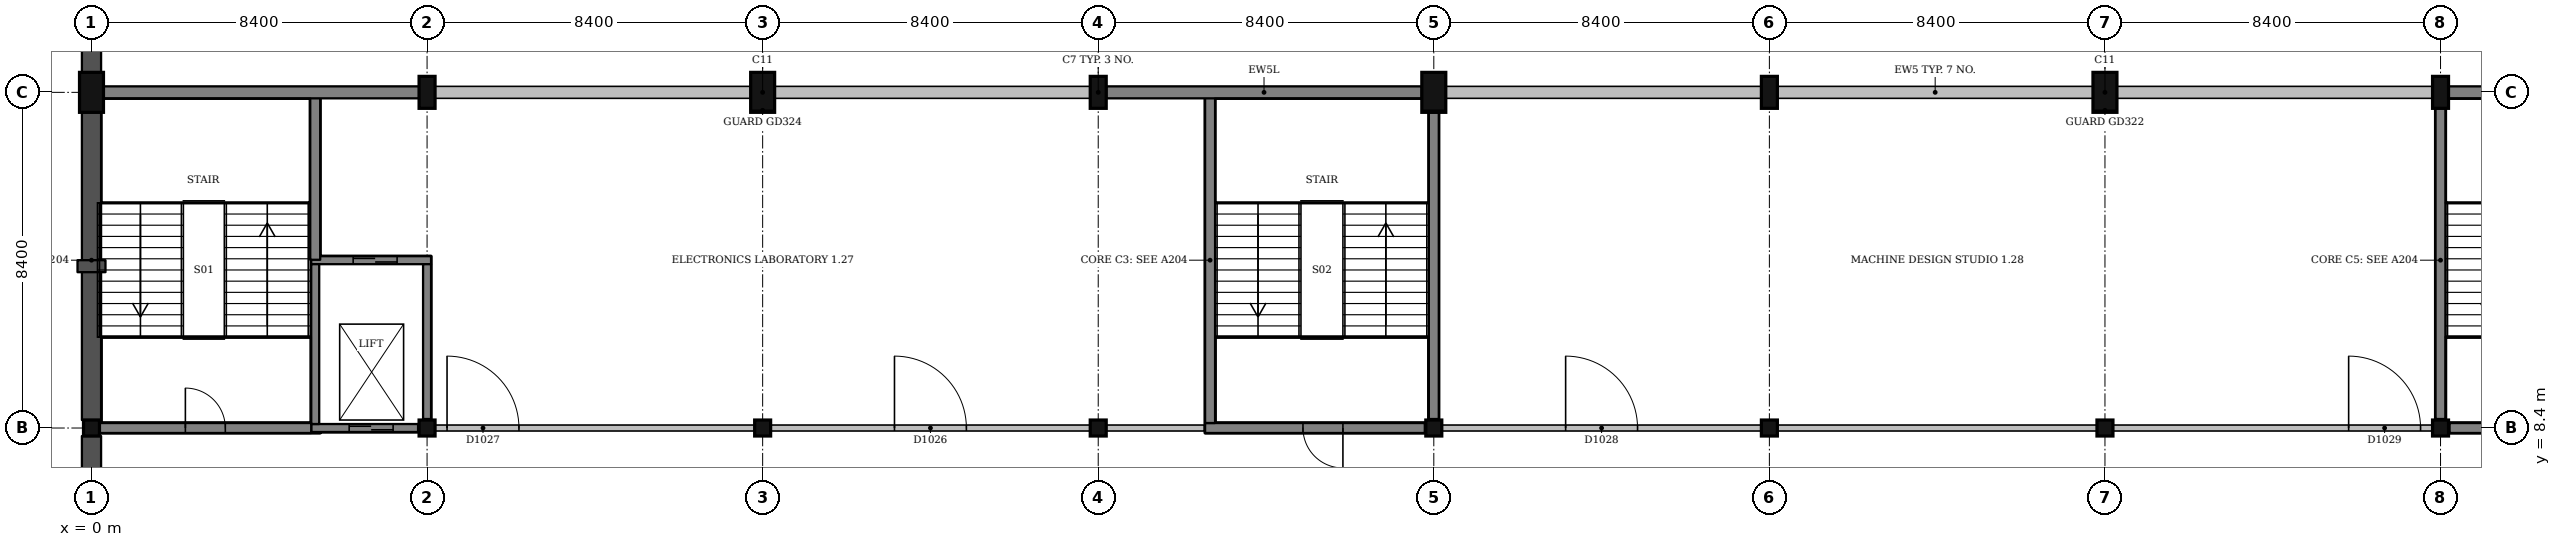
"""IFC4 building model, lengths in metres.
Left out: names, types, materials, properties, quantities, classifications, styles, units other than length and angle.
Written with IfcOpenShell. Run it as: python <this file> out.ifc"""

import sys

from ifc_helpers import new_model, si_unit, direction, frame, frame_2d, origin, origin_2d, place, context, subcontext, project, spatial, rectangle, extrude, element, fill, save


model = new_model("IFC4")
c1 = context("Model", 3, precision=1e-05, world=origin(), true_north=direction((0.0, 1.0)))
c2 = subcontext(c1, "Body", "Model", "MODEL_VIEW")
j1 = project(units=[si_unit("LENGTHUNIT", "METRE"), si_unit("PLANEANGLEUNIT", "RADIAN")], contexts=[c1])
p1 = place(None, origin())
s1 = spatial("IfcSite", under=j1, at=p1, CompositionType="ELEMENT")
p2 = place(p1, origin())
s2 = spatial("IfcBuilding", under=s1, at=p2, CompositionType="ELEMENT")
p3 = place(p2, frame((0.0, 0.0, 4.5)))
s3 = spatial("IfcBuildingStorey", under=s2, at=p3, CompositionType="ELEMENT", Elevation=4.5)
p4 = place(p3, frame((0.0, 8.4, 0.0), z_axis=(0.0, 0.0, 1.0), x_axis=(1.0, 0.0, 0.0)))
e1 = element("IfcColumn", 1, at=p4, inside=s3, PredefinedType="COLUMN", context=c2, shape_type="SweptSolid", body=[
    extrude(rectangle(XDim=0.4, YDim=0.4, at=origin_2d()), origin(), (0.0, 0.0, 1.0), 4.5),
])
p5 = place(p3, frame((0.0, 16.8, 0.0), z_axis=(0.0, 0.0, 1.0), x_axis=(1.0, 0.0, 0.0)))
e2 = element("IfcColumn", 2, at=p5, inside=s3, PredefinedType="COLUMN", context=c2, shape_type="SweptSolid", body=[
    extrude(rectangle(XDim=0.6, YDim=1.0, at=origin_2d()), origin(), (0.0, 0.0, 1.0), 4.5),
])
p6 = place(p3, frame((8.4, 8.4, 0.0), z_axis=(0.0, 0.0, 1.0), x_axis=(1.0, 0.0, 0.0)))
e3 = element("IfcColumn", 3, at=p6, inside=s3, PredefinedType="COLUMN", context=c2, shape_type="SweptSolid", body=[
    extrude(rectangle(XDim=0.4, YDim=0.4, at=origin_2d()), origin(), (0.0, 0.0, 1.0), 4.5),
])
p7 = place(p3, frame((8.4, 16.8, 0.0), z_axis=(0.0, 0.0, 1.0), x_axis=(1.0, 0.0, 0.0)))
e4 = element("IfcColumn", 4, at=p7, inside=s3, PredefinedType="COLUMN", context=c2, shape_type="SweptSolid", body=[
    extrude(rectangle(XDim=0.4, YDim=0.8, at=origin_2d()), origin(), (0.0, 0.0, 1.0), 4.5),
])
p8 = place(p3, frame((16.8, 8.4, 0.0), z_axis=(0.0, 0.0, 1.0), x_axis=(1.0, 0.0, 0.0)))
e5 = element("IfcColumn", 5, at=p8, inside=s3, PredefinedType="COLUMN", context=c2, shape_type="SweptSolid", body=[
    extrude(rectangle(XDim=0.4, YDim=0.4, at=origin_2d()), origin(), (0.0, 0.0, 1.0), 4.5),
])
p9 = place(p3, frame((16.8, 16.8, 0.0), z_axis=(0.0, 0.0, 1.0), x_axis=(1.0, 0.0, 0.0)))
e6 = element("IfcColumn", 6, at=p9, inside=s3, PredefinedType="COLUMN", context=c2, shape_type="SweptSolid", body=[
    extrude(rectangle(XDim=0.6, YDim=1.0, at=origin_2d()), origin(), (0.0, 0.0, 1.0), 4.5),
])
p10 = place(p3, frame((25.2, 8.4, 0.0), z_axis=(0.0, 0.0, 1.0), x_axis=(1.0, 0.0, 0.0)))
e7 = element("IfcColumn", 7, at=p10, inside=s3, PredefinedType="COLUMN", context=c2, shape_type="SweptSolid", body=[
    extrude(rectangle(XDim=0.4, YDim=0.4, at=origin_2d()), origin(), (0.0, 0.0, 1.0), 4.5),
])
p11 = place(p3, frame((25.2, 16.8, 0.0), z_axis=(0.0, 0.0, 1.0), x_axis=(1.0, 0.0, 0.0)))
e8 = element("IfcColumn", 8, at=p11, inside=s3, PredefinedType="COLUMN", context=c2, shape_type="SweptSolid", body=[
    extrude(rectangle(XDim=0.4, YDim=0.8, at=origin_2d()), origin(), (0.0, 0.0, 1.0), 4.5),
])
p12 = place(p3, frame((33.6, 8.4, 0.0), z_axis=(0.0, 0.0, 1.0), x_axis=(1.0, 0.0, 0.0)))
e9 = element("IfcColumn", 9, at=p12, inside=s3, PredefinedType="COLUMN", context=c2, shape_type="SweptSolid", body=[
    extrude(rectangle(XDim=0.4, YDim=0.4, at=origin_2d()), origin(), (0.0, 0.0, 1.0), 4.5),
])
p13 = place(p3, frame((33.6, 16.8, 0.0), z_axis=(0.0, 0.0, 1.0), x_axis=(1.0, 0.0, 0.0)))
e10 = element("IfcColumn", 10, at=p13, inside=s3, PredefinedType="COLUMN", context=c2, shape_type="SweptSolid", body=[
    extrude(rectangle(XDim=0.6, YDim=1.0, at=origin_2d()), origin(), (0.0, 0.0, 1.0), 4.5),
])
p14 = place(p3, frame((42.0, 8.4, 0.0), z_axis=(0.0, 0.0, 1.0), x_axis=(1.0, 0.0, 0.0)))
e11 = element("IfcColumn", 11, at=p14, inside=s3, PredefinedType="COLUMN", context=c2, shape_type="SweptSolid", body=[
    extrude(rectangle(XDim=0.4, YDim=0.4, at=origin_2d()), origin(), (0.0, 0.0, 1.0), 4.5),
])
p15 = place(p3, frame((42.0, 16.8, 0.0), z_axis=(0.0, 0.0, 1.0), x_axis=(1.0, 0.0, 0.0)))
e12 = element("IfcColumn", 12, at=p15, inside=s3, PredefinedType="COLUMN", context=c2, shape_type="SweptSolid", body=[
    extrude(rectangle(XDim=0.4, YDim=0.8, at=origin_2d()), origin(), (0.0, 0.0, 1.0), 4.5),
])
p16 = place(p3, frame((50.4, 8.4, 0.0), z_axis=(0.0, 0.0, 1.0), x_axis=(1.0, 0.0, 0.0)))
e13 = element("IfcColumn", 13, at=p16, inside=s3, PredefinedType="COLUMN", context=c2, shape_type="SweptSolid", body=[
    extrude(rectangle(XDim=0.4, YDim=0.4, at=origin_2d()), origin(), (0.0, 0.0, 1.0), 4.5),
])
p17 = place(p3, frame((50.4, 16.8, 0.0), z_axis=(0.0, 0.0, 1.0), x_axis=(1.0, 0.0, 0.0)))
e14 = element("IfcColumn", 14, at=p17, inside=s3, PredefinedType="COLUMN", context=c2, shape_type="SweptSolid", body=[
    extrude(rectangle(XDim=0.6, YDim=1.0, at=origin_2d()), origin(), (0.0, 0.0, 1.0), 4.5),
])
p18 = place(p3, frame((58.8, 8.4, 0.0), z_axis=(0.0, 0.0, 1.0), x_axis=(1.0, 0.0, 0.0)))
e15 = element("IfcColumn", 15, at=p18, inside=s3, PredefinedType="COLUMN", context=c2, shape_type="SweptSolid", body=[
    extrude(rectangle(XDim=0.4, YDim=0.4, at=origin_2d()), origin(), (0.0, 0.0, 1.0), 4.5),
])
p19 = place(p3, frame((58.8, 16.8, 0.0), z_axis=(0.0, 0.0, 1.0), x_axis=(1.0, 0.0, 0.0)))
e16 = element("IfcColumn", 16, at=p19, inside=s3, PredefinedType="COLUMN", context=c2, shape_type="SweptSolid", body=[
    extrude(rectangle(XDim=0.4, YDim=0.8, at=origin_2d()), origin(), (0.0, 0.0, 1.0), 4.5),
])
p20 = place(p3, frame((5.5, 8.4, 0.0), z_axis=(0.0, 0.0, 1.0), x_axis=(1.0, 0.0, 0.0)))
e17 = element("IfcWall", 17, at=p20, inside=s3, PredefinedType="SHEAR", context=c2, shape_type="SweptSolid", body=[
    extrude(rectangle(XDim=2.675, YDim=0.2, at=frame_2d((1.337, 0.0))), origin(), (0.0, 0.0, 1.0), 4.5),
])
p21 = place(p20, frame((0.95, 0.0, 0.0)))
e18 = element("IfcOpeningElement", 18, at=p21, cuts=e17, PredefinedType="OPENING", context=c2, shape_type="SweptSolid", body=[
    extrude(rectangle(XDim=1.1, YDim=2.1, at=frame_2d((0.55, 1.05))), frame((0.0, 0.11, 0.0), z_axis=(0.0, -1.0, 0.0), x_axis=(1.0, 0.0, 0.0)), (0.0, 0.0, 1.0), 0.22),
])
p22 = place(p3, frame((5.5, 12.6, 0.0), z_axis=(0.0, 0.0, 1.0), x_axis=(1.0, 0.0, 0.0)))
e19 = element("IfcWall", 19, at=p22, inside=s3, PredefinedType="SHEAR", context=c2, shape_type="SweptSolid", body=[
    extrude(rectangle(XDim=3.0, YDim=0.2, at=frame_2d((1.5, 0.0))), origin(), (0.0, 0.0, 1.0), 4.5),
])
p23 = place(p22, frame((1.05, 0.0, 0.0)))
e20 = element("IfcOpeningElement", 20, at=p23, cuts=e19, PredefinedType="OPENING", context=c2, shape_type="SweptSolid", body=[
    extrude(rectangle(XDim=1.1, YDim=2.1, at=frame_2d((0.55, 1.05))), frame((0.0, 0.11, 0.0), z_axis=(0.0, -1.0, 0.0), x_axis=(1.0, 0.0, 0.0)), (0.0, 0.0, 1.0), 0.22),
])
p24 = place(p3, frame((5.6, 8.5, 0.0), z_axis=(0.0, 0.0, 1.0), x_axis=(0.0, 1.0, 0.0)))
e21 = element("IfcWall", 21, at=p24, inside=s3, PredefinedType="SHEAR", context=c2, shape_type="SweptSolid", body=[
    extrude(rectangle(XDim=4.0, YDim=0.2, at=frame_2d((2.0, 0.0))), origin(), (0.0, 0.0, 1.0), 4.5),
])
p25 = place(p3, frame((8.4, 8.625, 0.0), z_axis=(0.0, 0.0, 1.0), x_axis=(0.0, 1.0, 0.0)))
e22 = element("IfcWall", 22, at=p25, inside=s3, PredefinedType="SHEAR", context=c2, shape_type="SweptSolid", body=[
    extrude(rectangle(XDim=3.875, YDim=0.2, at=frame_2d((1.938, 0.0))), origin(), (0.0, 0.0, 1.0), 4.5),
])
p26 = place(p3, frame((0.2, 8.4, 0.0), z_axis=(0.0, 0.0, 1.0), x_axis=(1.0, 0.0, 0.0)))
e23 = element("IfcWall", 23, at=p26, inside=s3, PredefinedType="SHEAR", context=c2, shape_type="SweptSolid", body=[
    extrude(rectangle(XDim=5.3, YDim=0.25, at=frame_2d((2.65, 0.0))), origin(), (0.0, 0.0, 1.0), 4.5),
])
p27 = place(p26, frame((2.15, 0.0, 0.0)))
e24 = element("IfcOpeningElement", 24, at=p27, cuts=e23, PredefinedType="OPENING", context=c2, shape_type="SweptSolid", body=[
    extrude(rectangle(XDim=1.0, YDim=2.1, at=frame_2d((0.5, 1.05))), frame((0.0, 0.135, 0.0), z_axis=(0.0, -1.0, 0.0), x_axis=(1.0, 0.0, 0.0)), (0.0, 0.0, 1.0), 0.27),
])
p28 = place(p3, frame((5.6, 12.61, 0.0), z_axis=(0.0, 0.0, 1.0), x_axis=(0.0, 1.0, 0.0)))
e25 = element("IfcWall", 25, at=p28, inside=s3, PredefinedType="SHEAR", context=c2, shape_type="SweptSolid", body=[
    extrude(rectangle(XDim=4.065, YDim=0.25, at=frame_2d((2.032, 0.0))), origin(), (0.0, 0.0, 1.0), 4.5),
])
p29 = place(p3, frame((27.875, 8.4, 0.0), z_axis=(0.0, 0.0, 1.0), x_axis=(1.0, 0.0, 0.0)))
e26 = element("IfcWall", 26, at=p29, inside=s3, PredefinedType="SHEAR", context=c2, shape_type="SweptSolid", body=[
    extrude(rectangle(XDim=5.5, YDim=0.25, at=frame_2d((2.75, 0.0))), origin(), (0.0, 0.0, 1.0), 4.5),
])
p30 = place(p29, frame((2.45, 0.0, 0.0)))
e27 = element("IfcOpeningElement", 27, at=p30, cuts=e26, PredefinedType="OPENING", context=c2, shape_type="SweptSolid", body=[
    extrude(rectangle(XDim=1.0, YDim=2.1, at=frame_2d((0.5, 1.05))), frame((0.0, 0.135, 0.0), z_axis=(0.0, -1.0, 0.0), x_axis=(1.0, 0.0, 0.0)), (0.0, 0.0, 1.0), 0.27),
])
p31 = place(p3, frame((28.0, 8.525, 0.0), z_axis=(0.0, 0.0, 1.0), x_axis=(0.0, 1.0, 0.0)))
e28 = element("IfcWall", 28, at=p31, inside=s3, PredefinedType="SHEAR", context=c2, shape_type="SweptSolid", body=[
    extrude(rectangle(XDim=8.15, YDim=0.25, at=frame_2d((4.075, 0.0))), origin(), (0.0, 0.0, 1.0), 4.5),
])
p32 = place(p3, frame((33.6, 8.625, 0.0), z_axis=(0.0, 0.0, 1.0), x_axis=(0.0, 1.0, 0.0)))
e29 = element("IfcWall", 29, at=p32, inside=s3, PredefinedType="SHEAR", context=c2, shape_type="SweptSolid", body=[
    extrude(rectangle(XDim=7.675, YDim=0.25, at=frame_2d((3.837, 0.0))), origin(), (0.0, 0.0, 1.0), 4.5),
])
p33 = place(p3, frame((59.025, 8.4, 0.0), z_axis=(0.0, 0.0, 1.0), x_axis=(1.0, 0.0, 0.0)))
e30 = element("IfcWall", 30, at=p33, inside=s3, PredefinedType="SHEAR", context=c2, shape_type="SweptSolid", body=[
    extrude(rectangle(XDim=5.5, YDim=0.25, at=frame_2d((2.75, 0.0))), origin(), (0.0, 0.0, 1.0), 4.5),
])
p34 = place(p33, frame((2.05, 0.0, 0.0)))
e31 = element("IfcOpeningElement", 31, at=p34, cuts=e30, PredefinedType="OPENING", context=c2, shape_type="SweptSolid", body=[
    extrude(rectangle(XDim=1.0, YDim=2.1, at=frame_2d((0.5, 1.05))), frame((0.0, 0.135, 0.0), z_axis=(0.0, -1.0, 0.0), x_axis=(1.0, 0.0, 0.0)), (0.0, 0.0, 1.0), 0.27),
])
p35 = place(p3, frame((58.8, 8.625, 0.0), z_axis=(0.0, 0.0, 1.0), x_axis=(0.0, 1.0, 0.0)))
e32 = element("IfcWall", 32, at=p35, inside=s3, PredefinedType="SHEAR", context=c2, shape_type="SweptSolid", body=[
    extrude(rectangle(XDim=7.775, YDim=0.25, at=frame_2d((3.887, 0.0))), origin(), (0.0, 0.0, 1.0), 4.5),
])
p36 = place(p3, frame((0.0, 16.3, 0.0), z_axis=(0.0, 0.0, 1.0), x_axis=(0.0, -1.0, 0.0)))
e33 = element("IfcWall", 33, at=p36, inside=s3, PredefinedType="SOLIDWALL", context=c2, shape_type="SweptSolid", body=[
    extrude(rectangle(XDim=3.7, YDim=0.48, at=frame_2d((1.85, 0.0))), origin(), (0.0, 0.0, 1.0), 3.75),
])
p37 = place(p3, frame((0.0, 12.6, 0.0), z_axis=(0.0, 0.0, 1.0), x_axis=(0.0, -1.0, 0.0)))
e34 = element("IfcWall", 34, at=p37, inside=s3, PredefinedType="SOLIDWALL", context=c2, shape_type="SweptSolid", body=[
    extrude(rectangle(XDim=0.3, YDim=0.7, at=frame_2d((0.15, 0.0))), origin(), (0.0, 0.0, 1.0), 3.75),
])
p38 = place(p3, frame((0.0, 12.3, 0.0), z_axis=(0.0, 0.0, 1.0), x_axis=(0.0, -1.0, 0.0)))
e35 = element("IfcWall", 35, at=p38, inside=s3, PredefinedType="SOLIDWALL", context=c2, shape_type="SweptSolid", body=[
    extrude(rectangle(XDim=3.7, YDim=0.48, at=frame_2d((1.85, 0.0))), origin(), (0.0, 0.0, 1.0), 3.75),
])
p39 = place(p3, frame((0.0, 8.2, 0.0), z_axis=(0.0, 0.0, 1.0), x_axis=(0.0, -1.0, 0.0)))
e36 = element("IfcWall", 36, at=p39, inside=s3, PredefinedType="SOLIDWALL", context=c2, shape_type="SweptSolid", body=[
    extrude(rectangle(XDim=3.85, YDim=0.48, at=frame_2d((1.925, 0.0))), origin(), (0.0, 0.0, 1.0), 3.45),
])
p40 = place(p3, frame((66.9, 16.8, 0.0), z_axis=(0.0, 0.0, 1.0), x_axis=(-1.0, 0.0, 0.0)))
e37 = element("IfcWall", 37, at=p40, inside=s3, PredefinedType="SOLIDWALL", context=c2, shape_type="SweptSolid", body=[
    extrude(rectangle(XDim=7.9, YDim=0.3, at=frame_2d((3.95, 0.0))), origin(), (0.0, 0.0, 1.0), 3.45),
])
for number, where, z_axis, x_axis in (
    (38, (58.6, 16.8, 0.0), (0.0, 0.0, 1.0), (-1.0, 0.0, 0.0)),
    (39, (50.1, 16.8, 0.0), (0.0, 0.0, 1.0), (-1.0, 0.0, 0.0)),
    (40, (41.8, 16.8, 0.0), (0.0, 0.0, 1.0), (-1.0, 0.0, 0.0)),
    (41, (33.3, 16.8, 0.0), (0.0, 0.0, 1.0), (-1.0, 0.0, 0.0)),
):
    element("IfcWall", number, at=place(p3, frame(where, z_axis=z_axis, x_axis=x_axis)), inside=s3, PredefinedType="SOLIDWALL", context=c2, shape_type="SweptSolid", body=[
        extrude(rectangle(XDim=7.9, YDim=0.3, at=frame_2d((3.95, 0.0))), origin(), (0.0, 0.0, 1.0), 3.45),
    ])
for number, where, z_axis, x_axis in (
    (42, (25.0, 16.8, 0.0), (0.0, 0.0, 1.0), (-1.0, 0.0, 0.0)),
    (43, (16.5, 16.8, 0.0), (0.0, 0.0, 1.0), (-1.0, 0.0, 0.0)),
    (44, (8.2, 16.8, 0.0), (0.0, 0.0, 1.0), (-1.0, 0.0, 0.0)),
):
    element("IfcWall", number, at=place(p3, frame(where, z_axis=z_axis, x_axis=x_axis)), inside=s3, PredefinedType="SOLIDWALL", context=c2, shape_type="SweptSolid", body=[
        extrude(rectangle(XDim=7.9, YDim=0.3, at=frame_2d((3.95, 0.0))), origin(), (0.0, 0.0, 1.0), 3.45),
    ])
p41 = place(p3, frame((0.0, 20.975, 0.0), z_axis=(0.0, 0.0, 1.0), x_axis=(0.0, -1.0, 0.0)))
e45 = element("IfcWall", 45, at=p41, inside=s3, PredefinedType="SOLIDWALL", context=c2, shape_type="SweptSolid", body=[
    extrude(rectangle(XDim=3.675, YDim=0.48, at=frame_2d((1.837, 0.0))), origin(), (0.0, 0.0, 1.0), 2.489),
])
p42 = place(p3, frame((33.8, 8.4, 0.0), z_axis=(0.0, 0.0, 1.0), x_axis=(1.0, 0.0, 0.0)))
e46 = element("IfcWall", 46, at=p42, inside=s3, PredefinedType="PARTITIONING", context=c2, shape_type="SweptSolid", body=[
    extrude(rectangle(XDim=8.0, YDim=0.15, at=frame_2d((4.0, 0.0))), origin(), (0.0, 0.0, 1.0), 3.5),
])
p43 = place(p42, frame((3.1, 0.0, 0.0)))
e47 = element("IfcOpeningElement", 47, at=p43, cuts=e46, PredefinedType="OPENING", context=c2, shape_type="SweptSolid", body=[
    extrude(rectangle(XDim=1.8, YDim=2.1, at=frame_2d((0.9, 1.05))), frame((0.0, 0.085, 0.0), z_axis=(0.0, -1.0, 0.0), x_axis=(1.0, 0.0, 0.0)), (0.0, 0.0, 1.0), 0.17),
])
p44 = place(p3, frame((42.2, 8.4, 0.0), z_axis=(0.0, 0.0, 1.0), x_axis=(1.0, 0.0, 0.0)))
e48 = element("IfcWall", 48, at=p44, inside=s3, PredefinedType="PARTITIONING", context=c2, shape_type="SweptSolid", body=[
    extrude(rectangle(XDim=8.0, YDim=0.15, at=frame_2d((4.0, 0.0))), origin(), (0.0, 0.0, 1.0), 3.5),
])
p45 = place(p3, frame((50.6, 8.4, 0.0), z_axis=(0.0, 0.0, 1.0), x_axis=(1.0, 0.0, 0.0)))
e49 = element("IfcWall", 49, at=p45, inside=s3, PredefinedType="PARTITIONING", context=c2, shape_type="SweptSolid", body=[
    extrude(rectangle(XDim=8.0, YDim=0.15, at=frame_2d((4.0, 0.0))), origin(), (0.0, 0.0, 1.0), 3.5),
])
p46 = place(p45, frame((5.9, 0.0, 0.0)))
e50 = element("IfcOpeningElement", 50, at=p46, cuts=e49, PredefinedType="OPENING", context=c2, shape_type="SweptSolid", body=[
    extrude(rectangle(XDim=1.8, YDim=2.1, at=frame_2d((0.9, 1.05))), frame((0.0, 0.085, 0.0), z_axis=(0.0, -1.0, 0.0), x_axis=(1.0, 0.0, 0.0)), (0.0, 0.0, 1.0), 0.17),
])
p47 = place(p3, frame((8.6, 8.4, 0.0), z_axis=(0.0, 0.0, 1.0), x_axis=(1.0, 0.0, 0.0)))
e51 = element("IfcWall", 51, at=p47, inside=s3, PredefinedType="PARTITIONING", context=c2, shape_type="SweptSolid", body=[
    extrude(rectangle(XDim=8.0, YDim=0.15, at=frame_2d((4.0, 0.0))), origin(), (0.0, 0.0, 1.0), 3.5),
])
p48 = place(p47, frame((0.3, 0.0, 0.0)))
e52 = element("IfcOpeningElement", 52, at=p48, cuts=e51, PredefinedType="OPENING", context=c2, shape_type="SweptSolid", body=[
    extrude(rectangle(XDim=1.8, YDim=2.1, at=frame_2d((0.9, 1.05))), frame((0.0, 0.085, 0.0), z_axis=(0.0, -1.0, 0.0), x_axis=(1.0, 0.0, 0.0)), (0.0, 0.0, 1.0), 0.17),
])
p49 = place(p3, frame((17.0, 8.4, 0.0), z_axis=(0.0, 0.0, 1.0), x_axis=(1.0, 0.0, 0.0)))
e53 = element("IfcWall", 53, at=p49, inside=s3, PredefinedType="PARTITIONING", context=c2, shape_type="SweptSolid", body=[
    extrude(rectangle(XDim=8.0, YDim=0.15, at=frame_2d((4.0, 0.0))), origin(), (0.0, 0.0, 1.0), 3.5),
])
p50 = place(p49, frame((3.1, 0.0, 0.0)))
e54 = element("IfcOpeningElement", 54, at=p50, cuts=e53, PredefinedType="OPENING", context=c2, shape_type="SweptSolid", body=[
    extrude(rectangle(XDim=1.8, YDim=2.1, at=frame_2d((0.9, 1.05))), frame((0.0, 0.085, 0.0), z_axis=(0.0, -1.0, 0.0), x_axis=(1.0, 0.0, 0.0)), (0.0, 0.0, 1.0), 0.17),
])
p51 = place(p3, frame((25.4, 8.4, 0.0), z_axis=(0.0, 0.0, 1.0), x_axis=(1.0, 0.0, 0.0)))
e55 = element("IfcWall", 55, at=p51, inside=s3, PredefinedType="PARTITIONING", context=c2, shape_type="SweptSolid", body=[
    extrude(rectangle(XDim=2.45, YDim=0.15, at=frame_2d((1.225, 0.0))), origin(), (0.0, 0.0, 1.0), 3.6),
])
p52 = place(p50, origin())
e56 = element("IfcDoor", 56, at=p52, inside=s3, OperationType="DOUBLE_DOOR_SINGLE_SWING", PredefinedType="DOOR", context=c2, shape_type="SweptSolid", body=[
    extrude(rectangle(XDim=1.8, YDim=2.1, at=frame_2d((0.9, 1.05))), frame((0.0, 0.025, 0.0), z_axis=(0.0, -1.0, 0.0), x_axis=(1.0, 0.0, 0.0)), (0.0, 0.0, 1.0), 0.05),
])
fill(e54, e56)
p53 = place(p48, origin())
e57 = element("IfcDoor", 57, at=p53, inside=s3, OperationType="DOUBLE_DOOR_SINGLE_SWING", PredefinedType="DOOR", context=c2, shape_type="SweptSolid", body=[
    extrude(rectangle(XDim=1.8, YDim=2.1, at=frame_2d((0.9, 1.05))), frame((0.0, 0.025, 0.0), z_axis=(0.0, -1.0, 0.0), x_axis=(1.0, 0.0, 0.0)), (0.0, 0.0, 1.0), 0.05),
])
fill(e52, e57)
p54 = place(p43, origin())
e58 = element("IfcDoor", 58, at=p54, inside=s3, OperationType="DOUBLE_DOOR_SINGLE_SWING", PredefinedType="DOOR", context=c2, shape_type="SweptSolid", body=[
    extrude(rectangle(XDim=1.8, YDim=2.1, at=frame_2d((0.9, 1.05))), frame((0.0, 0.025, 0.0), z_axis=(0.0, -1.0, 0.0), x_axis=(1.0, 0.0, 0.0)), (0.0, 0.0, 1.0), 0.05),
])
fill(e47, e58)
p55 = place(p46, origin())
e59 = element("IfcDoor", 59, at=p55, inside=s3, OperationType="DOUBLE_DOOR_SINGLE_SWING", PredefinedType="DOOR", context=c2, shape_type="SweptSolid", body=[
    extrude(rectangle(XDim=1.8, YDim=2.1, at=frame_2d((0.9, 1.05))), frame((0.0, 0.025, 0.0), z_axis=(0.0, -1.0, 0.0), x_axis=(1.0, 0.0, 0.0)), (0.0, 0.0, 1.0), 0.05),
])
fill(e50, e59)
p56 = place(p27, origin())
e60 = element("IfcDoor", 60, at=p56, inside=s3, OperationType="SINGLE_SWING_LEFT", PredefinedType="DOOR", context=c2, shape_type="SweptSolid", body=[
    extrude(rectangle(XDim=1.0, YDim=2.1, at=frame_2d((0.5, 1.05))), frame((0.0, 0.025, 0.0), z_axis=(0.0, -1.0, 0.0), x_axis=(1.0, 0.0, 0.0)), (0.0, 0.0, 1.0), 0.05),
])
fill(e24, e60)
p57 = place(p30, origin())
e61 = element("IfcDoor", 61, at=p57, inside=s3, OperationType="SINGLE_SWING_RIGHT", PredefinedType="DOOR", context=c2, shape_type="SweptSolid", body=[
    extrude(rectangle(XDim=1.0, YDim=2.1, at=frame_2d((0.5, 1.05))), frame((0.0, 0.025, 0.0), z_axis=(0.0, -1.0, 0.0), x_axis=(1.0, 0.0, 0.0)), (0.0, 0.0, 1.0), 0.05),
])
fill(e27, e61)
p58 = place(p21, origin())
e62 = element("IfcDoor", 62, at=p58, inside=s3, OperationType="SLIDING_TO_LEFT", PredefinedType="DOOR", context=c2, shape_type="SweptSolid", body=[
    extrude(rectangle(XDim=1.1, YDim=2.1, at=frame_2d((0.55, 1.05))), frame((0.0, 0.025, 0.0), z_axis=(0.0, -1.0, 0.0), x_axis=(1.0, 0.0, 0.0)), (0.0, 0.0, 1.0), 0.05),
])
fill(e18, e62)
p59 = place(p23, origin())
e63 = element("IfcDoor", 63, at=p59, inside=s3, OperationType="SLIDING_TO_RIGHT", PredefinedType="DOOR", context=c2, shape_type="SweptSolid", body=[
    extrude(rectangle(XDim=1.1, YDim=2.1, at=frame_2d((0.55, 1.05))), frame((0.0, 0.025, 0.0), z_axis=(0.0, -1.0, 0.0), x_axis=(1.0, 0.0, 0.0)), (0.0, 0.0, 1.0), 0.05),
])
fill(e20, e63)
save(model, sys.argv[1])
